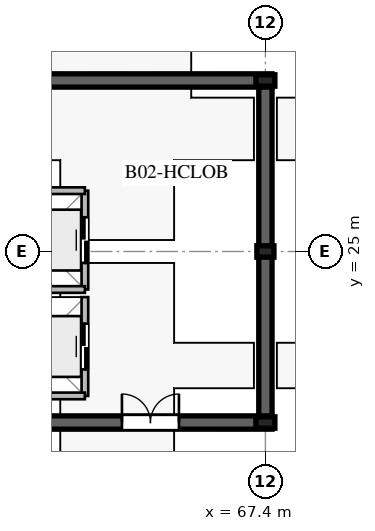
"""IFC4 building model, lengths in metres.
Left out: names, types, materials, properties, quantities, classifications, styles, units other than length and angle.
Written with IfcOpenShell. Run it as: python <this file> out.ifc"""

import sys

from ifc_helpers import new_model, si_unit, direction, frame, frame_2d, origin, origin_2d, place, context, subcontext, project, spatial, rectangle, i_section, extrude, element, fill, save


model = new_model("IFC4")
c1 = context("Model", 3, precision=1e-05, world=origin(), true_north=direction((0.0, 1.0)))
c2 = subcontext(c1, "Body", "Model", "MODEL_VIEW")
j1 = project(units=[si_unit("LENGTHUNIT", "METRE"), si_unit("PLANEANGLEUNIT", "RADIAN")], contexts=[c1])
p1 = place(None, origin())
s1 = spatial("IfcSite", under=j1, at=p1, CompositionType="ELEMENT")
p2 = place(p1, origin())
s2 = spatial("IfcBuilding", under=s1, at=p2, CompositionType="ELEMENT")
p3 = place(p2, frame((0.0, 0.0, -8.4)))
s3 = spatial("IfcBuildingStorey", under=s2, at=p3, CompositionType="ELEMENT", Elevation=-8.4)
p4 = place(p3, frame((59.425, 20.5, 0.0), z_axis=(0.0, 0.0, 1.0), x_axis=(1.0, 0.0, 0.0)))
e1 = element("IfcWall", 1, at=p4, inside=s3, PredefinedType="SHEAR", context=c2, shape_type="SweptSolid", body=[
    extrude(rectangle(XDim=8.15, YDim=0.35, at=frame_2d((4.075, 0.0))), origin(), (0.0, 0.0, 1.0), 3.88),
])
p5 = place(p4, frame((4.2, 0.0, 0.0)))
e2 = element("IfcOpeningElement", 2, at=p5, cuts=e1, PredefinedType="OPENING", context=c2, shape_type="SweptSolid", body=[
    extrude(rectangle(XDim=1.5, YDim=2.2, at=frame_2d((0.75, 1.1))), frame((0.0, 0.185, 0.0), z_axis=(0.0, -1.0, 0.0), x_axis=(1.0, 0.0, 0.0)), (0.0, 0.0, 1.0), 0.37),
])
p6 = place(p3, frame((67.575, 29.5, 0.0), z_axis=(0.0, 0.0, 1.0), x_axis=(-1.0, 0.0, 0.0)))
e3 = element("IfcWall", 3, at=p6, inside=s3, PredefinedType="SHEAR", context=c2, shape_type="SweptSolid", body=[
    extrude(rectangle(XDim=8.15, YDim=0.35, at=frame_2d((4.075, 0.0))), origin(), (0.0, 0.0, 1.0), 3.88),
])
p7 = place(p3, frame((67.4, 20.675, 0.0), z_axis=(0.0, 0.0, 1.0), x_axis=(0.0, 1.0, 0.0)))
e4 = element("IfcWall", 4, at=p7, inside=s3, PredefinedType="SHEAR", context=c2, shape_type="SweptSolid", body=[
    extrude(rectangle(XDim=8.65, YDim=0.35, at=frame_2d((4.325, 0.0))), origin(), (0.0, 0.0, 1.0), 3.88),
])
for number, where, z_axis, x_axis in (
    (5, (67.4, 20.5, 0.0), (0.0, 0.0, 1.0), (1.0, 0.0, 0.0)),
    (6, (67.4, 29.5, 0.0), (0.0, 0.0, 1.0), (1.0, 0.0, 0.0)),
):
    element("IfcColumn", number, at=place(p3, frame(where, z_axis=z_axis, x_axis=x_axis)), inside=s3, PredefinedType="COLUMN", context=c2, shape_type="SweptSolid", body=[
        extrude(i_section(OverallWidth=0.3, OverallDepth=0.5, WebThickness=0.014, FlangeThickness=0.028, at=origin_2d()), origin(), (0.0, 0.0, 1.0), 4.2),
    ])
p8 = place(p3, frame((67.4, 25.0, 0.0), z_axis=(0.0, 0.0, 1.0), x_axis=(1.0, 0.0, 0.0)))
e7 = element("IfcColumn", 7, at=p8, inside=s3, PredefinedType="COLUMN", context=c2, shape_type="SweptSolid", body=[
    extrude(i_section(OverallWidth=0.3, OverallDepth=0.45, WebThickness=0.014, FlangeThickness=0.026, at=origin_2d()), origin(), (0.0, 0.0, 1.0), 4.2),
])
p9 = place(p3, frame((62.65, 21.2, 0.0), z_axis=(0.0, 0.0, 1.0), x_axis=(0.0, 1.0, 0.0)))
e8 = element("IfcWall", 8, at=p9, inside=s3, PredefinedType="PARTITIONING", context=c2, shape_type="SweptSolid", body=[
    extrude(rectangle(XDim=2.6, YDim=0.175, at=frame_2d((1.3, 0.0))), origin(), (0.0, 0.0, 1.0), 3.88),
])
p10 = place(p9, frame((0.7, 0.0, 0.0)))
e9 = element("IfcOpeningElement", 9, at=p10, cuts=e8, PredefinedType="OPENING", context=c2, shape_type="SweptSolid", body=[
    extrude(rectangle(XDim=1.2, YDim=2.2, at=frame_2d((0.6, 1.1))), frame((0.0, 0.098, 0.0), z_axis=(0.0, -1.0, 0.0), x_axis=(1.0, 0.0, 0.0)), (0.0, 0.0, 1.0), 0.195),
])
p11 = place(p3, frame((60.05, 21.2, 0.0), z_axis=(0.0, 0.0, 1.0), x_axis=(1.0, 0.0, 0.0)))
e10 = element("IfcWall", 10, at=p11, inside=s3, PredefinedType="PARTITIONING", context=c2, shape_type="SweptSolid", body=[
    extrude(rectangle(XDim=2.6, YDim=0.175, at=frame_2d((1.3, 0.0))), origin(), (0.0, 0.0, 1.0), 3.88),
])
p12 = place(p3, frame((62.65, 24.0, 0.0), z_axis=(0.0, 0.0, 1.0), x_axis=(0.0, 1.0, 0.0)))
e11 = element("IfcWall", 11, at=p12, inside=s3, PredefinedType="PARTITIONING", context=c2, shape_type="SweptSolid", body=[
    extrude(rectangle(XDim=2.6, YDim=0.175, at=frame_2d((1.3, 0.0))), origin(), (0.0, 0.0, 1.0), 3.52),
])
p13 = place(p12, frame((0.7, 0.0, 0.0)))
e12 = element("IfcOpeningElement", 12, at=p13, cuts=e11, PredefinedType="OPENING", context=c2, shape_type="SweptSolid", body=[
    extrude(rectangle(XDim=1.2, YDim=2.2, at=frame_2d((0.6, 1.1))), frame((0.0, 0.098, 0.0), z_axis=(0.0, -1.0, 0.0), x_axis=(1.0, 0.0, 0.0)), (0.0, 0.0, 1.0), 0.195),
])
for number, where, z_axis, x_axis in (
    (13, (60.05, 24.0, 0.0), (0.0, 0.0, 1.0), (1.0, 0.0, 0.0)),
    (14, (60.05, 26.6, 0.0), (0.0, 0.0, 1.0), (1.0, 0.0, 0.0)),
):
    element("IfcWall", number, at=place(p3, frame(where, z_axis=z_axis, x_axis=x_axis)), inside=s3, PredefinedType="PARTITIONING", context=c2, shape_type="SweptSolid", body=[
        extrude(rectangle(XDim=2.6, YDim=0.175, at=frame_2d((1.3, 0.0))), origin(), (0.0, 0.0, 1.0), 3.88),
    ])
p14 = place(p10, origin())
e15 = element("IfcDoor", 15, at=p14, inside=s3, OperationType="DOUBLE_DOOR_SLIDING", PredefinedType="DOOR", context=c2, shape_type="SweptSolid", body=[
    extrude(rectangle(XDim=1.2, YDim=2.2, at=frame_2d((0.6, 1.1))), frame((0.0, 0.025, 0.0), z_axis=(0.0, -1.0, 0.0), x_axis=(1.0, 0.0, 0.0)), (0.0, 0.0, 1.0), 0.05),
])
fill(e9, e15)
p15 = place(p13, origin())
e16 = element("IfcDoor", 16, at=p15, inside=s3, OperationType="DOUBLE_DOOR_SLIDING", PredefinedType="DOOR", context=c2, shape_type="SweptSolid", body=[
    extrude(rectangle(XDim=1.2, YDim=2.2, at=frame_2d((0.6, 1.1))), frame((0.0, 0.025, 0.0), z_axis=(0.0, -1.0, 0.0), x_axis=(1.0, 0.0, 0.0)), (0.0, 0.0, 1.0), 0.05),
])
fill(e12, e16)
p16 = place(p5, origin())
e17 = element("IfcDoor", 17, at=p16, inside=s3, OperationType="DOUBLE_DOOR_SINGLE_SWING", PredefinedType="DOOR", context=c2, shape_type="SweptSolid", body=[
    extrude(rectangle(XDim=1.5, YDim=2.2, at=frame_2d((0.75, 1.1))), frame((0.0, 0.025, 0.0), z_axis=(0.0, -1.0, 0.0), x_axis=(1.0, 0.0, 0.0)), (0.0, 0.0, 1.0), 0.05),
])
fill(e2, e17)
save(model, sys.argv[1])
